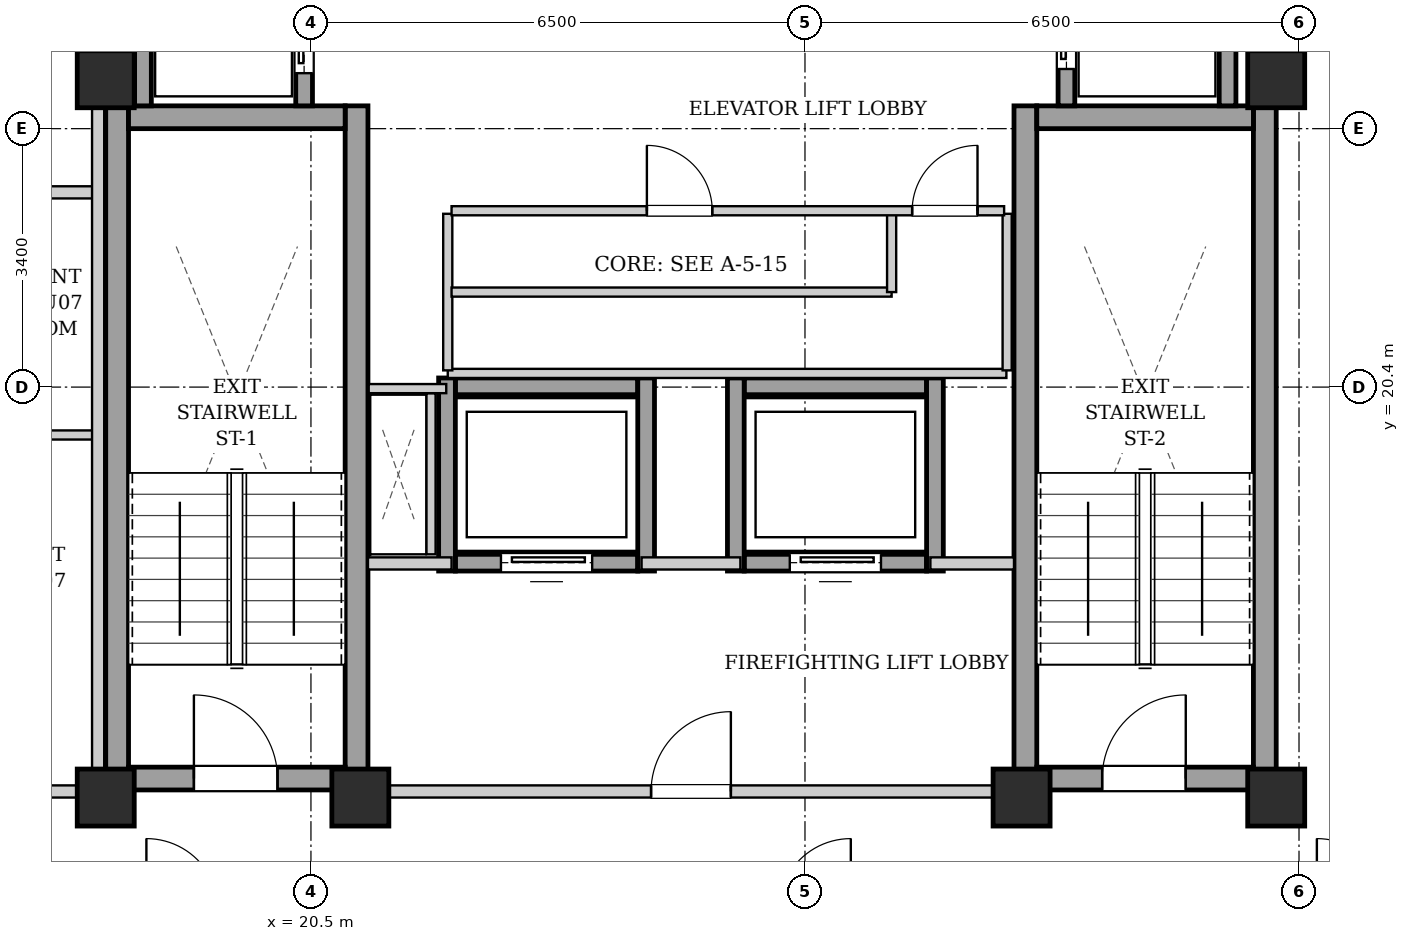
"""IFC4 building model, lengths in metres.
Left out: names, types, materials, properties, quantities, classifications, styles, units other than length and angle.
Written with IfcOpenShell. Run it as: python <this file> out.ifc"""

import sys

from ifc_helpers import new_model, si_unit, direction, frame, frame_2d, origin, origin_2d, place, context, subcontext, project, spatial, rectangle, extrude, element, fill, save


model = new_model("IFC4")
c1 = context("Model", 3, precision=1e-05, world=origin(), true_north=direction((0.0, 1.0)))
c2 = subcontext(c1, "Body", "Model", "MODEL_VIEW")
j1 = project(units=[si_unit("LENGTHUNIT", "METRE"), si_unit("PLANEANGLEUNIT", "RADIAN")], contexts=[c1])
p1 = place(None, origin())
s1 = spatial("IfcSite", under=j1, at=p1, CompositionType="ELEMENT")
p2 = place(p1, origin())
s2 = spatial("IfcBuilding", under=s1, at=p2, CompositionType="ELEMENT")
p3 = place(p2, frame((0.0, 0.0, 237.7)))
s3 = spatial("IfcBuildingStorey", under=s2, at=p3, CompositionType="ELEMENT", Elevation=237.7)
for number, where, z_axis, x_axis in (
    (1, (17.8, 15.0, 0.0), (0.0, 0.0, 1.0), (1.0, 0.0, 0.0)),
    (2, (21.15, 15.0, 0.0), (0.0, 0.0, 1.0), (1.0, 0.0, 0.0)),
    (3, (29.85, 15.0, 0.0), (0.0, 0.0, 1.0), (1.0, 0.0, 0.0)),
    (4, (33.2, 15.0, 0.0), (0.0, 0.0, 1.0), (1.0, 0.0, 0.0)),
    (5, (17.8, 24.45, 0.0), (0.0, 0.0, 1.0), (1.0, 0.0, 0.0)),
    (6, (33.2, 24.45, 0.0), (0.0, 0.0, 1.0), (1.0, 0.0, 0.0)),
):
    element("IfcColumn", number, at=place(p3, frame(where, z_axis=z_axis, x_axis=x_axis)), inside=s3, PredefinedType="COLUMN", context=c2, shape_type="SweptSolid", body=[
        extrude(rectangle(XDim=0.75, YDim=0.75, at=origin_2d()), origin(), (0.0, 0.0, 1.0), 3.4),
    ])
for number, where, z_axis, x_axis in (
    (7, (17.95, 15.1, 0.0), (0.0, 0.0, 1.0), (0.0, 1.0, 0.0)),
    (8, (21.1, 15.1, 0.0), (0.0, 0.0, 1.0), (0.0, 1.0, 0.0)),
):
    element("IfcWall", number, at=place(p3, frame(where, z_axis=z_axis, x_axis=x_axis)), inside=s3, PredefinedType="SHEAR", context=c2, shape_type="SweptSolid", body=[
        extrude(rectangle(XDim=9.0, YDim=0.3, at=frame_2d((4.5, 0.0))), origin(), (0.0, 0.0, 1.0), 3.14),
    ])
p4 = place(p3, frame((18.1, 23.95, 0.0), z_axis=(0.0, 0.0, 1.0), x_axis=(1.0, 0.0, 0.0)))
e9 = element("IfcWall", 9, at=p4, inside=s3, PredefinedType="SHEAR", context=c2, shape_type="SweptSolid", body=[
    extrude(rectangle(XDim=2.85, YDim=0.3, at=frame_2d((1.425, 0.0))), origin(), (0.0, 0.0, 1.0), 3.14),
])
p5 = place(p3, frame((18.1, 15.25, 0.0), z_axis=(0.0, 0.0, 1.0), x_axis=(1.0, 0.0, 0.0)))
e10 = element("IfcWall", 10, at=p5, inside=s3, PredefinedType="SHEAR", context=c2, shape_type="SweptSolid", body=[
    extrude(rectangle(XDim=2.85, YDim=0.3, at=frame_2d((1.425, 0.0))), origin(), (0.0, 0.0, 1.0), 3.14),
])
p6 = place(p5, frame((0.86, 0.0, 0.0)))
e11 = element("IfcOpeningElement", 11, at=p6, cuts=e10, PredefinedType="OPENING", context=c2, shape_type="SweptSolid", body=[
    extrude(rectangle(XDim=1.1, YDim=2.05, at=frame_2d((0.55, 1.025))), frame((0.0, 0.16, 0.0), z_axis=(0.0, -1.0, 0.0), x_axis=(1.0, 0.0, 0.0)), (0.0, 0.0, 1.0), 0.32),
])
for number, where, z_axis, x_axis in (
    (12, (29.9, 15.1, 0.0), (0.0, 0.0, 1.0), (0.0, 1.0, 0.0)),
    (13, (33.05, 15.1, 0.0), (0.0, 0.0, 1.0), (0.0, 1.0, 0.0)),
):
    element("IfcWall", number, at=place(p3, frame(where, z_axis=z_axis, x_axis=x_axis)), inside=s3, PredefinedType="SHEAR", context=c2, shape_type="SweptSolid", body=[
        extrude(rectangle(XDim=9.0, YDim=0.3, at=frame_2d((4.5, 0.0))), origin(), (0.0, 0.0, 1.0), 3.14),
    ])
p7 = place(p3, frame((30.05, 23.95, 0.0), z_axis=(0.0, 0.0, 1.0), x_axis=(1.0, 0.0, 0.0)))
e14 = element("IfcWall", 14, at=p7, inside=s3, PredefinedType="SHEAR", context=c2, shape_type="SweptSolid", body=[
    extrude(rectangle(XDim=2.85, YDim=0.3, at=frame_2d((1.425, 0.0))), origin(), (0.0, 0.0, 1.0), 3.14),
])
p8 = place(p3, frame((30.05, 15.25, 0.0), z_axis=(0.0, 0.0, 1.0), x_axis=(1.0, 0.0, 0.0)))
e15 = element("IfcWall", 15, at=p8, inside=s3, PredefinedType="SHEAR", context=c2, shape_type="SweptSolid", body=[
    extrude(rectangle(XDim=2.85, YDim=0.3, at=frame_2d((1.425, 0.0))), origin(), (0.0, 0.0, 1.0), 3.14),
])
p9 = place(p8, frame((0.86, 0.0, 0.0)))
e16 = element("IfcOpeningElement", 16, at=p9, cuts=e15, PredefinedType="OPENING", context=c2, shape_type="SweptSolid", body=[
    extrude(rectangle(XDim=1.1, YDim=2.05, at=frame_2d((0.55, 1.025))), frame((0.0, 0.16, 0.0), z_axis=(0.0, -1.0, 0.0), x_axis=(1.0, 0.0, 0.0)), (0.0, 0.0, 1.0), 0.32),
])
p10 = place(p3, frame((18.29, 24.1, 0.0), z_axis=(0.0, 0.0, 1.0), x_axis=(0.0, 1.0, 0.0)))
e17 = element("IfcWall", 17, at=p10, inside=s3, PredefinedType="SHEAR", context=c2, shape_type="SweptSolid", body=[
    extrude(rectangle(XDim=4.14, YDim=0.22, at=frame_2d((2.07, 0.0))), origin(), (0.0, 0.0, 1.0), 3.14),
])
p11 = place(p3, frame((20.41, 24.1, 0.0), z_axis=(0.0, 0.0, 1.0), x_axis=(0.0, 1.0, 0.0)))
e18 = element("IfcWall", 18, at=p11, inside=s3, PredefinedType="SHEAR", context=c2, shape_type="SweptSolid", body=[
    extrude(rectangle(XDim=1.96, YDim=0.22, at=frame_2d((0.98, 0.0))), origin(), (0.0, 0.0, 1.0), 3.14),
])
p12 = place(p11, frame((0.43, 0.0, 0.0)))
e19 = element("IfcOpeningElement", 19, at=p12, cuts=e18, PredefinedType="OPENING", context=c2, shape_type="SweptSolid", body=[
    extrude(rectangle(XDim=1.1, YDim=2.15, at=frame_2d((0.55, 1.075))), frame((0.0, 0.12, 0.0), z_axis=(0.0, -1.0, 0.0), x_axis=(1.0, 0.0, 0.0)), (0.0, 0.0, 1.0), 0.24),
])
p13 = place(p3, frame((30.44, 24.1, 0.0), z_axis=(0.0, 0.0, 1.0), x_axis=(0.0, 1.0, 0.0)))
e20 = element("IfcWall", 20, at=p13, inside=s3, PredefinedType="SHEAR", context=c2, shape_type="SweptSolid", body=[
    extrude(rectangle(XDim=2.07, YDim=0.22, at=frame_2d((1.035, 0.0))), origin(), (0.0, 0.0, 1.0), 3.14),
])
p14 = place(p13, frame((0.485, 0.0, 0.0)))
e21 = element("IfcOpeningElement", 21, at=p14, cuts=e20, PredefinedType="OPENING", context=c2, shape_type="SweptSolid", body=[
    extrude(rectangle(XDim=1.1, YDim=2.15, at=frame_2d((0.55, 1.075))), frame((0.0, 0.12, 0.0), z_axis=(0.0, -1.0, 0.0), x_axis=(1.0, 0.0, 0.0)), (0.0, 0.0, 1.0), 0.24),
])
p15 = place(p3, frame((32.56, 24.1, 0.0), z_axis=(0.0, 0.0, 1.0), x_axis=(0.0, 1.0, 0.0)))
e22 = element("IfcWall", 22, at=p15, inside=s3, PredefinedType="SHEAR", context=c2, shape_type="SweptSolid", body=[
    extrude(rectangle(XDim=2.07, YDim=0.22, at=frame_2d((1.035, 0.0))), origin(), (0.0, 0.0, 1.0), 3.14),
])
p16 = place(p3, frame((22.4, 18.09, 0.0), z_axis=(0.0, 0.0, 1.0), x_axis=(1.0, 0.0, 0.0)))
e23 = element("IfcWall", 23, at=p16, inside=s3, PredefinedType="SHEAR", context=c2, shape_type="SweptSolid", body=[
    extrude(rectangle(XDim=2.4, YDim=0.22, at=frame_2d((1.2, 0.0))), origin(), (0.0, 0.0, 1.0), 3.14),
])
p17 = place(p16, frame((0.6, 0.0, 0.0)))
e24 = element("IfcOpeningElement", 24, at=p17, cuts=e23, PredefinedType="OPENING", context=c2, shape_type="SweptSolid", body=[
    extrude(rectangle(XDim=1.2, YDim=2.15, at=frame_2d((0.6, 1.075))), frame((0.0, 0.12, 0.0), z_axis=(0.0, -1.0, 0.0), x_axis=(1.0, 0.0, 0.0)), (0.0, 0.0, 1.0), 0.24),
])
p18 = place(p3, frame((22.4, 20.41, 0.0), z_axis=(0.0, 0.0, 1.0), x_axis=(1.0, 0.0, 0.0)))
e25 = element("IfcWall", 25, at=p18, inside=s3, PredefinedType="SHEAR", context=c2, shape_type="SweptSolid", body=[
    extrude(rectangle(XDim=2.4, YDim=0.22, at=frame_2d((1.2, 0.0))), origin(), (0.0, 0.0, 1.0), 3.14),
])
for number, where, z_axis, x_axis in (
    (26, (22.29, 17.98, 0.0), (0.0, 0.0, 1.0), (0.0, 1.0, 0.0)),
    (27, (24.91, 17.98, 0.0), (0.0, 0.0, 1.0), (0.0, 1.0, 0.0)),
):
    element("IfcWall", number, at=place(p3, frame(where, z_axis=z_axis, x_axis=x_axis)), inside=s3, PredefinedType="SHEAR", context=c2, shape_type="SweptSolid", body=[
        extrude(rectangle(XDim=2.54, YDim=0.22, at=frame_2d((1.27, 0.0))), origin(), (0.0, 0.0, 1.0), 3.14),
    ])
p19 = place(p3, frame((26.2, 18.09, 0.0), z_axis=(0.0, 0.0, 1.0), x_axis=(1.0, 0.0, 0.0)))
e28 = element("IfcWall", 28, at=p19, inside=s3, PredefinedType="SHEAR", context=c2, shape_type="SweptSolid", body=[
    extrude(rectangle(XDim=2.4, YDim=0.22, at=frame_2d((1.2, 0.0))), origin(), (0.0, 0.0, 1.0), 3.14),
])
p20 = place(p19, frame((0.6, 0.0, 0.0)))
e29 = element("IfcOpeningElement", 29, at=p20, cuts=e28, PredefinedType="OPENING", context=c2, shape_type="SweptSolid", body=[
    extrude(rectangle(XDim=1.2, YDim=2.15, at=frame_2d((0.6, 1.075))), frame((0.0, 0.12, 0.0), z_axis=(0.0, -1.0, 0.0), x_axis=(1.0, 0.0, 0.0)), (0.0, 0.0, 1.0), 0.24),
])
p21 = place(p3, frame((26.2, 20.41, 0.0), z_axis=(0.0, 0.0, 1.0), x_axis=(1.0, 0.0, 0.0)))
e30 = element("IfcWall", 30, at=p21, inside=s3, PredefinedType="SHEAR", context=c2, shape_type="SweptSolid", body=[
    extrude(rectangle(XDim=2.4, YDim=0.22, at=frame_2d((1.2, 0.0))), origin(), (0.0, 0.0, 1.0), 3.14),
])
for number, where, z_axis, x_axis in (
    (31, (26.09, 17.98, 0.0), (0.0, 0.0, 1.0), (0.0, 1.0, 0.0)),
    (32, (28.71, 17.98, 0.0), (0.0, 0.0, 1.0), (0.0, 1.0, 0.0)),
):
    element("IfcWall", number, at=place(p3, frame(where, z_axis=z_axis, x_axis=x_axis)), inside=s3, PredefinedType="SHEAR", context=c2, shape_type="SweptSolid", body=[
        extrude(rectangle(XDim=2.54, YDim=0.22, at=frame_2d((1.27, 0.0))), origin(), (0.0, 0.0, 1.0), 3.14),
    ])
p22 = place(p3, frame((21.25, 15.08, 0.0), z_axis=(0.0, 0.0, 1.0), x_axis=(1.0, 0.0, 0.0)))
e33 = element("IfcWall", 33, at=p22, inside=s3, PredefinedType="PARTITIONING", context=c2, shape_type="SweptSolid", body=[
    extrude(rectangle(XDim=8.5, YDim=0.16, at=frame_2d((4.25, 0.0))), origin(), (0.0, 0.0, 1.0), 2.668),
])
p23 = place(p22, frame((3.725, 0.0, 0.0)))
e34 = element("IfcOpeningElement", 34, at=p23, cuts=e33, PredefinedType="OPENING", context=c2, shape_type="SweptSolid", body=[
    extrude(rectangle(XDim=1.05, YDim=2.05, at=frame_2d((0.525, 1.025))), frame((0.0, 0.09, 0.0), z_axis=(0.0, -1.0, 0.0), x_axis=(1.0, 0.0, 0.0)), (0.0, 0.0, 1.0), 0.18),
])
p24 = place(p3, frame((21.25, 18.08, 0.0), z_axis=(0.0, 0.0, 1.0), x_axis=(1.0, 0.0, 0.0)))
e35 = element("IfcWall", 35, at=p24, inside=s3, PredefinedType="PARTITIONING", context=c2, shape_type="SweptSolid", body=[
    extrude(rectangle(XDim=1.1, YDim=0.16, at=frame_2d((0.55, 0.0))), origin(), (0.0, 0.0, 1.0), 3.14),
])
p25 = place(p3, frame((24.85, 18.08, 0.0), z_axis=(0.0, 0.0, 1.0), x_axis=(1.0, 0.0, 0.0)))
e36 = element("IfcWall", 36, at=p25, inside=s3, PredefinedType="PARTITIONING", context=c2, shape_type="SweptSolid", body=[
    extrude(rectangle(XDim=1.3, YDim=0.16, at=frame_2d((0.65, 0.0))), origin(), (0.0, 0.0, 1.0), 3.14),
])
p26 = place(p3, frame((28.65, 18.08, 0.0), z_axis=(0.0, 0.0, 1.0), x_axis=(1.0, 0.0, 0.0)))
e37 = element("IfcWall", 37, at=p26, inside=s3, PredefinedType="PARTITIONING", context=c2, shape_type="SweptSolid", body=[
    extrude(rectangle(XDim=1.1, YDim=0.16, at=frame_2d((0.55, 0.0))), origin(), (0.0, 0.0, 1.0), 3.14),
])
for number, where, z_axis, x_axis in (
    (38, (17.88, 24.12, 0.0), (0.0, 0.0, 1.0), (0.0, 1.0, 0.0)),
    (39, (33.12, 24.12, 0.0), (0.0, 0.0, 1.0), (0.0, 1.0, 0.0)),
):
    element("IfcWall", number, at=place(p3, frame(where, z_axis=z_axis, x_axis=x_axis)), inside=s3, PredefinedType="PARTITIONING", context=c2, shape_type="SweptSolid", body=[
        extrude(rectangle(XDim=4.76, YDim=0.16, at=frame_2d((2.38, 0.0))), origin(), (0.0, 0.0, 1.0), 2.475),
    ])
p27 = place(p3, frame((22.08, 18.2, 0.0), z_axis=(0.0, 0.0, 1.0), x_axis=(0.0, 1.0, 0.0)))
e40 = element("IfcWall", 40, at=p27, inside=s3, PredefinedType="PARTITIONING", context=c2, shape_type="SweptSolid", body=[
    extrude(rectangle(XDim=2.12, YDim=0.12, at=frame_2d((1.06, 0.0))), origin(), (0.0, 0.0, 1.0), 3.14),
])
p28 = place(p3, frame((22.28, 20.38, 0.0), z_axis=(0.0, 0.0, 1.0), x_axis=(-1.0, 0.0, 0.0)))
e41 = element("IfcWall", 41, at=p28, inside=s3, PredefinedType="PARTITIONING", context=c2, shape_type="SweptSolid", body=[
    extrude(rectangle(XDim=1.02, YDim=0.12, at=frame_2d((0.51, 0.0))), origin(), (0.0, 0.0, 1.0), 3.14),
])
p29 = place(p3, frame((22.3, 20.58, 0.0), z_axis=(0.0, 0.0, 1.0), x_axis=(1.0, 0.0, 0.0)))
e42 = element("IfcWall", 42, at=p29, inside=s3, PredefinedType="PARTITIONING", context=c2, shape_type="SweptSolid", body=[
    extrude(rectangle(XDim=7.35, YDim=0.12, at=frame_2d((3.675, 0.0))), origin(), (0.0, 0.0, 1.0), 3.14),
])
for number, where, z_axis, x_axis in (
    (43, (22.3, 20.62, 0.0), (0.0, 0.0, 1.0), (0.0, 1.0, 0.0)),
    (44, (29.66, 20.62, 0.0), (0.0, 0.0, 1.0), (0.0, 1.0, 0.0)),
):
    element("IfcWall", number, at=place(p3, frame(where, z_axis=z_axis, x_axis=x_axis)), inside=s3, PredefinedType="PARTITIONING", context=c2, shape_type="SweptSolid", body=[
        extrude(rectangle(XDim=2.06, YDim=0.12, at=frame_2d((1.03, 0.0))), origin(), (0.0, 0.0, 1.0), 3.14),
    ])
p30 = place(p3, frame((22.35, 21.65, 0.0), z_axis=(0.0, 0.0, 1.0), x_axis=(1.0, 0.0, 0.0)))
e45 = element("IfcWall", 45, at=p30, inside=s3, PredefinedType="PARTITIONING", context=c2, shape_type="SweptSolid", body=[
    extrude(rectangle(XDim=5.79, YDim=0.12, at=frame_2d((2.895, 0.0))), origin(), (0.0, 0.0, 1.0), 3.14),
])
p31 = place(p3, frame((28.14, 21.65, 0.0), z_axis=(0.0, 0.0, 1.0), x_axis=(0.0, 1.0, 0.0)))
e46 = element("IfcWall", 46, at=p31, inside=s3, PredefinedType="PARTITIONING", context=c2, shape_type="SweptSolid", body=[
    extrude(rectangle(XDim=1.03, YDim=0.12, at=frame_2d((0.515, 0.0))), origin(), (0.0, 0.0, 1.0), 3.14),
])
p32 = place(p3, frame((22.35, 22.72, 0.0), z_axis=(0.0, 0.0, 1.0), x_axis=(1.0, 0.0, 0.0)))
e47 = element("IfcWall", 47, at=p32, inside=s3, PredefinedType="PARTITIONING", context=c2, shape_type="SweptSolid", body=[
    extrude(rectangle(XDim=7.27, YDim=0.12, at=frame_2d((3.635, 0.0))), origin(), (0.0, 0.0, 1.0), 3.14),
])
p33 = place(p32, frame((2.57, 0.0, 0.0)))
e48 = element("IfcOpeningElement", 48, at=p33, cuts=e47, PredefinedType="OPENING", context=c2, shape_type="SweptSolid", body=[
    extrude(rectangle(XDim=0.86, YDim=2.05, at=frame_2d((0.43, 1.025))), frame((0.0, 0.07, 0.0), z_axis=(0.0, -1.0, 0.0), x_axis=(1.0, 0.0, 0.0)), (0.0, 0.0, 1.0), 0.14),
])
p34 = place(p32, frame((6.06, 0.0, 0.0)))
e49 = element("IfcOpeningElement", 49, at=p34, cuts=e47, PredefinedType="OPENING", context=c2, shape_type="SweptSolid", body=[
    extrude(rectangle(XDim=0.86, YDim=2.05, at=frame_2d((0.43, 1.025))), frame((0.0, 0.07, 0.0), z_axis=(0.0, -1.0, 0.0), x_axis=(1.0, 0.0, 0.0)), (0.0, 0.0, 1.0), 0.14),
])
p35 = place(p3, frame((10.88, 15.08, 0.0), z_axis=(0.0, 0.0, 1.0), x_axis=(1.0, 0.0, 0.0)))
e50 = element("IfcWall", 50, at=p35, inside=s3, PredefinedType="PARTITIONING", context=c2, shape_type="SweptSolid", body=[
    extrude(rectangle(XDim=6.88, YDim=0.16, at=frame_2d((3.44, 0.0))), origin(), (0.0, 0.0, 1.0), 2.668),
])
p36 = place(p35, frame((5.06, 0.0, 0.0)))
e51 = element("IfcOpeningElement", 51, at=p36, cuts=e50, PredefinedType="OPENING", context=c2, shape_type="SweptSolid", body=[
    extrude(rectangle(XDim=0.95, YDim=2.1, at=frame_2d((0.475, 1.05))), frame((0.0, 0.09, 0.0), z_axis=(0.0, -1.0, 0.0), x_axis=(1.0, 0.0, 0.0)), (0.0, 0.0, 1.0), 0.18),
])
p37 = place(p3, frame((10.88, 22.962, 0.0), z_axis=(0.0, 0.0, 1.0), x_axis=(1.0, 0.0, 0.0)))
e52 = element("IfcWall", 52, at=p37, inside=s3, PredefinedType="PARTITIONING", context=c2, shape_type="SweptSolid", body=[
    extrude(rectangle(XDim=6.76, YDim=0.16, at=frame_2d((3.38, 0.0))), origin(), (0.0, 0.0, 1.0), 3.14),
])
p38 = place(p3, frame((15.19, 19.77, 0.0), z_axis=(0.0, 0.0, 1.0), x_axis=(1.0, 0.0, 0.0)))
e53 = element("IfcWall", 53, at=p38, inside=s3, PredefinedType="PARTITIONING", context=c2, shape_type="SweptSolid", body=[
    extrude(rectangle(XDim=2.45, YDim=0.12, at=frame_2d((1.225, 0.0))), origin(), (0.0, 0.0, 1.0), 3.14),
])
p39 = place(p38, frame((0.795, 0.0, 0.0)))
e54 = element("IfcOpeningElement", 54, at=p39, cuts=e53, PredefinedType="OPENING", context=c2, shape_type="SweptSolid", body=[
    extrude(rectangle(XDim=0.86, YDim=2.05, at=frame_2d((0.43, 1.025))), frame((0.0, 0.07, 0.0), z_axis=(0.0, -1.0, 0.0), x_axis=(1.0, 0.0, 0.0)), (0.0, 0.0, 1.0), 0.14),
])
p40 = place(p3, frame((17.7, 15.02, 0.0), z_axis=(0.0, 0.0, 1.0), x_axis=(0.0, 1.0, 0.0)))
e55 = element("IfcWall", 55, at=p40, inside=s3, PredefinedType="PARTITIONING", context=c2, shape_type="SweptSolid", body=[
    extrude(rectangle(XDim=13.98, YDim=0.16, at=frame_2d((6.99, 0.0))), origin(), (0.0, 0.0, 1.0), 2.475),
])
p41 = place(p6, origin())
e56 = element("IfcDoor", 56, at=p41, inside=s3, OperationType="SINGLE_SWING_LEFT", PredefinedType="DOOR", context=c2, shape_type="SweptSolid", body=[
    extrude(rectangle(XDim=1.1, YDim=2.05, at=frame_2d((0.55, 1.025))), frame((0.0, 0.025, 0.0), z_axis=(0.0, -1.0, 0.0), x_axis=(1.0, 0.0, 0.0)), (0.0, 0.0, 1.0), 0.05),
])
fill(e11, e56)
p42 = place(p9, origin())
e57 = element("IfcDoor", 57, at=p42, inside=s3, OperationType="SINGLE_SWING_RIGHT", PredefinedType="DOOR", context=c2, shape_type="SweptSolid", body=[
    extrude(rectangle(XDim=1.1, YDim=2.05, at=frame_2d((0.55, 1.025))), frame((0.0, 0.025, 0.0), z_axis=(0.0, -1.0, 0.0), x_axis=(1.0, 0.0, 0.0)), (0.0, 0.0, 1.0), 0.05),
])
fill(e16, e57)
p43 = place(p12, origin())
e58 = element("IfcDoor", 58, at=p43, inside=s3, OperationType="SLIDING_TO_LEFT", PredefinedType="DOOR", context=c2, shape_type="SweptSolid", body=[
    extrude(rectangle(XDim=1.1, YDim=2.15, at=frame_2d((0.55, 1.075))), frame((0.0, 0.025, 0.0), z_axis=(0.0, -1.0, 0.0), x_axis=(1.0, 0.0, 0.0)), (0.0, 0.0, 1.0), 0.05),
])
fill(e19, e58)
p44 = place(p14, origin())
e59 = element("IfcDoor", 59, at=p44, inside=s3, OperationType="SLIDING_TO_LEFT", PredefinedType="DOOR", context=c2, shape_type="SweptSolid", body=[
    extrude(rectangle(XDim=1.1, YDim=2.15, at=frame_2d((0.55, 1.075))), frame((0.0, 0.025, 0.0), z_axis=(0.0, -1.0, 0.0), x_axis=(1.0, 0.0, 0.0)), (0.0, 0.0, 1.0), 0.05),
])
fill(e21, e59)
p45 = place(p17, origin())
e60 = element("IfcDoor", 60, at=p45, inside=s3, OperationType="SLIDING_TO_LEFT", PredefinedType="DOOR", context=c2, shape_type="SweptSolid", body=[
    extrude(rectangle(XDim=1.2, YDim=2.15, at=frame_2d((0.6, 1.075))), frame((0.0, 0.025, 0.0), z_axis=(0.0, -1.0, 0.0), x_axis=(1.0, 0.0, 0.0)), (0.0, 0.0, 1.0), 0.05),
])
fill(e24, e60)
p46 = place(p20, origin())
e61 = element("IfcDoor", 61, at=p46, inside=s3, OperationType="SLIDING_TO_LEFT", PredefinedType="DOOR", context=c2, shape_type="SweptSolid", body=[
    extrude(rectangle(XDim=1.2, YDim=2.15, at=frame_2d((0.6, 1.075))), frame((0.0, 0.025, 0.0), z_axis=(0.0, -1.0, 0.0), x_axis=(1.0, 0.0, 0.0)), (0.0, 0.0, 1.0), 0.05),
])
fill(e29, e61)
p47 = place(p23, origin())
e62 = element("IfcDoor", 62, at=p47, inside=s3, OperationType="SINGLE_SWING_RIGHT", PredefinedType="DOOR", context=c2, shape_type="SweptSolid", body=[
    extrude(rectangle(XDim=1.05, YDim=2.05, at=frame_2d((0.525, 1.025))), frame((0.0, 0.025, 0.0), z_axis=(0.0, -1.0, 0.0), x_axis=(1.0, 0.0, 0.0)), (0.0, 0.0, 1.0), 0.05),
])
fill(e34, e62)
p48 = place(p33, origin())
e63 = element("IfcDoor", 63, at=p48, inside=s3, OperationType="SINGLE_SWING_LEFT", PredefinedType="DOOR", context=c2, shape_type="SweptSolid", body=[
    extrude(rectangle(XDim=0.86, YDim=2.05, at=frame_2d((0.43, 1.025))), frame((0.0, 0.025, 0.0), z_axis=(0.0, -1.0, 0.0), x_axis=(1.0, 0.0, 0.0)), (0.0, 0.0, 1.0), 0.05),
])
fill(e48, e63)
p49 = place(p34, origin())
e64 = element("IfcDoor", 64, at=p49, inside=s3, OperationType="SINGLE_SWING_RIGHT", PredefinedType="DOOR", context=c2, shape_type="SweptSolid", body=[
    extrude(rectangle(XDim=0.86, YDim=2.05, at=frame_2d((0.43, 1.025))), frame((0.0, 0.025, 0.0), z_axis=(0.0, -1.0, 0.0), x_axis=(1.0, 0.0, 0.0)), (0.0, 0.0, 1.0), 0.05),
])
fill(e49, e64)
save(model, sys.argv[1])
